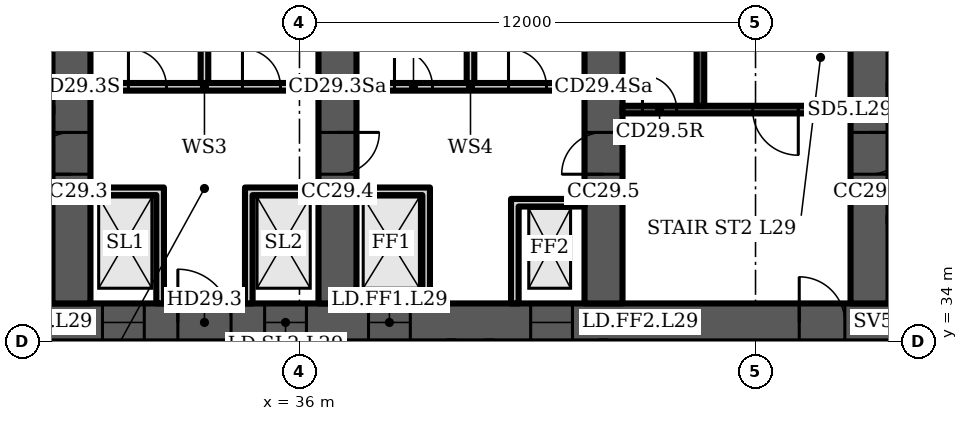
"""IFC4 building model, lengths in metres.
Left out: names, types, materials, properties, quantities, classifications, styles, units other than length and angle.
Written with IfcOpenShell. Run it as: python <this file> out.ifc"""

import sys

from ifc_helpers import new_model, si_unit, direction, frame, frame_2d, origin, place, context, subcontext, project, spatial, polyline, rectangle, outline, extrude, element, fill, save


model = new_model("IFC4")
c1 = context("Model", 3, precision=1e-05, world=origin(), true_north=direction((0.0, 1.0)))
c2 = subcontext(c1, "Body", "Model", "MODEL_VIEW")
j1 = project(units=[si_unit("LENGTHUNIT", "METRE"), si_unit("PLANEANGLEUNIT", "RADIAN")], contexts=[c1])
p1 = place(None, origin())
s1 = spatial("IfcSite", under=j1, at=p1, CompositionType="ELEMENT")
p2 = place(p1, origin())
s2 = spatial("IfcBuilding", under=s1, at=p2, CompositionType="ELEMENT")
p3 = place(p2, frame((0.0, 0.0, 125.5)))
s3 = spatial("IfcBuildingStorey", under=s2, at=p3, CompositionType="ELEMENT", Elevation=125.5)
p4 = place(p3, frame((16.0, 34.5, 0.0), z_axis=(0.0, 0.0, 1.0), x_axis=(1.0, 0.0, 0.0)))
e1 = element("IfcWall", 1, at=p4, inside=s3, PredefinedType="SHEAR", context=c2, shape_type="SweptSolid", body=[
    extrude(rectangle(XDim=49.0, YDim=1.0, at=frame_2d((24.5, 0.0))), origin(), (0.0, 0.0, 1.0), 3.6),
])
p5 = place(p4, frame((1.2, 0.0, 0.0)))
e2 = element("IfcOpeningElement", 2, at=p5, cuts=e1, PredefinedType="OPENING", context=c2, shape_type="SweptSolid", body=[
    extrude(rectangle(XDim=1.1, YDim=2.1, at=frame_2d((0.55, 1.05))), frame((0.0, 0.51, 0.0), z_axis=(0.0, -1.0, 0.0), x_axis=(1.0, 0.0, 0.0)), (0.0, 0.0, 1.0), 1.02),
])
p6 = place(p4, frame((5.083, 0.0, 0.0)))
e3 = element("IfcOpeningElement", 3, at=p6, cuts=e1, PredefinedType="OPENING", context=c2, shape_type="SweptSolid", body=[
    extrude(rectangle(XDim=1.1, YDim=2.1, at=frame_2d((0.55, 1.05))), frame((0.0, 0.51, 0.0), z_axis=(0.0, -1.0, 0.0), x_axis=(1.0, 0.0, 0.0)), (0.0, 0.0, 1.0), 1.02),
])
p7 = place(p4, frame((2.933, 0.0, 0.0)))
e4 = element("IfcOpeningElement", 4, at=p7, cuts=e1, PredefinedType="OPENING", context=c2, shape_type="SweptSolid", body=[
    extrude(rectangle(XDim=1.4, YDim=2.1, at=frame_2d((0.7, 1.05))), frame((0.0, 0.51, 0.0), z_axis=(0.0, -1.0, 0.0), x_axis=(1.0, 0.0, 0.0)), (0.0, 0.0, 1.0), 1.02),
])
p8 = place(p4, frame((7.65, 0.0, 0.0)))
e5 = element("IfcOpeningElement", 5, at=p8, cuts=e1, PredefinedType="OPENING", context=c2, shape_type="SweptSolid", body=[
    extrude(rectangle(XDim=1.2, YDim=2.1, at=frame_2d((0.6, 1.05))), frame((0.0, 0.51, 0.0), z_axis=(0.0, -1.0, 0.0), x_axis=(1.0, 0.0, 0.0)), (0.0, 0.0, 1.0), 1.02),
])
p9 = place(p4, frame((14.817, 0.0, 0.0)))
e6 = element("IfcOpeningElement", 6, at=p9, cuts=e1, PredefinedType="OPENING", context=c2, shape_type="SweptSolid", body=[
    extrude(rectangle(XDim=1.1, YDim=2.1, at=frame_2d((0.55, 1.05))), frame((0.0, 0.51, 0.0), z_axis=(0.0, -1.0, 0.0), x_axis=(1.0, 0.0, 0.0)), (0.0, 0.0, 1.0), 1.02),
])
p10 = place(p4, frame((19.083, 0.0, 0.0)))
e7 = element("IfcOpeningElement", 7, at=p10, cuts=e1, PredefinedType="OPENING", context=c2, shape_type="SweptSolid", body=[
    extrude(rectangle(XDim=1.1, YDim=2.1, at=frame_2d((0.55, 1.05))), frame((0.0, 0.51, 0.0), z_axis=(0.0, -1.0, 0.0), x_axis=(1.0, 0.0, 0.0)), (0.0, 0.0, 1.0), 1.02),
])
p11 = place(p4, frame((16.8, 0.0, 0.0)))
e8 = element("IfcOpeningElement", 8, at=p11, cuts=e1, PredefinedType="OPENING", context=c2, shape_type="SweptSolid", body=[
    extrude(rectangle(XDim=1.4, YDim=2.1, at=frame_2d((0.7, 1.05))), frame((0.0, 0.51, 0.0), z_axis=(0.0, -1.0, 0.0), x_axis=(1.0, 0.0, 0.0)), (0.0, 0.0, 1.0), 1.02),
])
p12 = place(p4, frame((21.817, 0.0, 0.0)))
e9 = element("IfcOpeningElement", 9, at=p12, cuts=e1, PredefinedType="OPENING", context=c2, shape_type="SweptSolid", body=[
    extrude(rectangle(XDim=1.1, YDim=2.1, at=frame_2d((0.55, 1.05))), frame((0.0, 0.51, 0.0), z_axis=(0.0, -1.0, 0.0), x_axis=(1.0, 0.0, 0.0)), (0.0, 0.0, 1.0), 1.02),
])
p13 = place(p4, frame((26.083, 0.0, 0.0)))
e10 = element("IfcOpeningElement", 10, at=p13, cuts=e1, PredefinedType="OPENING", context=c2, shape_type="SweptSolid", body=[
    extrude(rectangle(XDim=1.1, YDim=2.1, at=frame_2d((0.55, 1.05))), frame((0.0, 0.51, 0.0), z_axis=(0.0, -1.0, 0.0), x_axis=(1.0, 0.0, 0.0)), (0.0, 0.0, 1.0), 1.02),
])
p14 = place(p4, frame((33.15, 0.0, 0.0)))
e11 = element("IfcOpeningElement", 11, at=p14, cuts=e1, PredefinedType="OPENING", context=c2, shape_type="SweptSolid", body=[
    extrude(rectangle(XDim=1.2, YDim=2.1, at=frame_2d((0.6, 1.05))), frame((0.0, 0.51, 0.0), z_axis=(0.0, -1.0, 0.0), x_axis=(1.0, 0.0, 0.0)), (0.0, 0.0, 1.0), 1.02),
])
p15 = place(p4, frame((37.8, 0.0, 0.0)))
e12 = element("IfcOpeningElement", 12, at=p15, cuts=e1, PredefinedType="OPENING", context=c2, shape_type="SweptSolid", body=[
    extrude(rectangle(XDim=1.4, YDim=2.1, at=frame_2d((0.7, 1.05))), frame((0.0, 0.51, 0.0), z_axis=(0.0, -1.0, 0.0), x_axis=(1.0, 0.0, 0.0)), (0.0, 0.0, 1.0), 1.02),
])
p16 = place(p4, frame((42.817, 0.0, 0.0)))
e13 = element("IfcOpeningElement", 13, at=p16, cuts=e1, PredefinedType="OPENING", context=c2, shape_type="SweptSolid", body=[
    extrude(rectangle(XDim=1.1, YDim=2.1, at=frame_2d((0.55, 1.05))), frame((0.0, 0.51, 0.0), z_axis=(0.0, -1.0, 0.0), x_axis=(1.0, 0.0, 0.0)), (0.0, 0.0, 1.0), 1.02),
])
p17 = place(p4, frame((46.7, 0.0, 0.0)))
e14 = element("IfcOpeningElement", 14, at=p17, cuts=e1, PredefinedType="OPENING", context=c2, shape_type="SweptSolid", body=[
    extrude(rectangle(XDim=1.1, YDim=2.1, at=frame_2d((0.55, 1.05))), frame((0.0, 0.51, 0.0), z_axis=(0.0, -1.0, 0.0), x_axis=(1.0, 0.0, 0.0)), (0.0, 0.0, 1.0), 1.02),
])
p18 = place(p4, frame((44.667, 0.0, 0.0)))
e15 = element("IfcOpeningElement", 15, at=p18, cuts=e1, PredefinedType="OPENING", context=c2, shape_type="SweptSolid", body=[
    extrude(rectangle(XDim=1.4, YDim=2.1, at=frame_2d((0.7, 1.05))), frame((0.0, 0.51, 0.0), z_axis=(0.0, -1.0, 0.0), x_axis=(1.0, 0.0, 0.0)), (0.0, 0.0, 1.0), 1.02),
])
p19 = place(p3, frame((30.0, 35.0, 0.0), z_axis=(0.0, 0.0, 1.0), x_axis=(0.0, 1.0, 0.0)))
e16 = element("IfcWall", 16, at=p19, inside=s3, PredefinedType="SHEAR", context=c2, shape_type="SweptSolid", body=[
    extrude(rectangle(XDim=13.965, YDim=1.0, at=frame_2d((6.982, 0.0))), origin(), (0.0, 0.0, 1.0), 3.6),
])
p20 = place(p19, frame((3.4, 0.0, 0.0)))
e17 = element("IfcOpeningElement", 17, at=p20, cuts=e16, PredefinedType="OPENING", context=c2, shape_type="SweptSolid", body=[
    extrude(rectangle(XDim=1.1, YDim=2.1, at=frame_2d((0.55, 1.05))), frame((0.0, 0.51, 0.0), z_axis=(0.0, -1.0, 0.0), x_axis=(1.0, 0.0, 0.0)), (0.0, 0.0, 1.0), 1.02),
])
p21 = place(p3, frame((37.0, 35.0, 0.0), z_axis=(0.0, 0.0, 1.0), x_axis=(0.0, 1.0, 0.0)))
e18 = element("IfcWall", 18, at=p21, inside=s3, PredefinedType="SHEAR", context=c2, shape_type="SweptSolid", body=[
    extrude(rectangle(XDim=14.577, YDim=1.0, at=frame_2d((7.289, 0.0))), origin(), (0.0, 0.0, 1.0), 3.6),
])
p22 = place(p21, frame((3.4, 0.0, 0.0)))
e19 = element("IfcOpeningElement", 19, at=p22, cuts=e18, PredefinedType="OPENING", context=c2, shape_type="SweptSolid", body=[
    extrude(rectangle(XDim=1.1, YDim=2.1, at=frame_2d((0.55, 1.05))), frame((0.0, 0.51, 0.0), z_axis=(0.0, -1.0, 0.0), x_axis=(1.0, 0.0, 0.0)), (0.0, 0.0, 1.0), 1.02),
])
p23 = place(p21, frame((9.8, 0.0, 0.0)))
e20 = element("IfcOpeningElement", 20, at=p23, cuts=e18, PredefinedType="OPENING", context=c2, shape_type="SweptSolid", body=[
    extrude(rectangle(XDim=1.0, YDim=2.1, at=frame_2d((0.5, 1.05))), frame((0.0, 0.51, 0.0), z_axis=(0.0, -1.0, 0.0), x_axis=(1.0, 0.0, 0.0)), (0.0, 0.0, 1.0), 1.02),
])
p24 = place(p3, frame((44.0, 35.0, 0.0), z_axis=(0.0, 0.0, 1.0), x_axis=(0.0, 1.0, 0.0)))
e21 = element("IfcWall", 21, at=p24, inside=s3, PredefinedType="SHEAR", context=c2, shape_type="SweptSolid", body=[
    extrude(rectangle(XDim=14.577, YDim=1.0, at=frame_2d((7.289, 0.0))), origin(), (0.0, 0.0, 1.0), 3.6),
])
p25 = place(p24, frame((3.4, 0.0, 0.0)))
e22 = element("IfcOpeningElement", 22, at=p25, cuts=e21, PredefinedType="OPENING", context=c2, shape_type="SweptSolid", body=[
    extrude(rectangle(XDim=1.1, YDim=2.1, at=frame_2d((0.55, 1.05))), frame((0.0, 0.51, 0.0), z_axis=(0.0, -1.0, 0.0), x_axis=(1.0, 0.0, 0.0)), (0.0, 0.0, 1.0), 1.02),
])
p26 = place(p24, frame((9.8, 0.0, 0.0)))
e23 = element("IfcOpeningElement", 23, at=p26, cuts=e21, PredefinedType="OPENING", context=c2, shape_type="SweptSolid", body=[
    extrude(rectangle(XDim=1.0, YDim=2.1, at=frame_2d((0.5, 1.05))), frame((0.0, 0.51, 0.0), z_axis=(0.0, -1.0, 0.0), x_axis=(1.0, 0.0, 0.0)), (0.0, 0.0, 1.0), 1.02),
])
p27 = place(p3, frame((51.0, 35.0, 0.0), z_axis=(0.0, 0.0, 1.0), x_axis=(0.0, 1.0, 0.0)))
e24 = element("IfcWall", 24, at=p27, inside=s3, PredefinedType="SHEAR", context=c2, shape_type="SweptSolid", body=[
    extrude(rectangle(XDim=13.965, YDim=1.0, at=frame_2d((6.982, 0.0))), origin(), (0.0, 0.0, 1.0), 3.6),
])
p28 = place(p27, frame((3.4, 0.0, 0.0)))
e25 = element("IfcOpeningElement", 25, at=p28, cuts=e24, PredefinedType="OPENING", context=c2, shape_type="SweptSolid", body=[
    extrude(rectangle(XDim=1.1, YDim=2.1, at=frame_2d((0.55, 1.05))), frame((0.0, 0.51, 0.0), z_axis=(0.0, -1.0, 0.0), x_axis=(1.0, 0.0, 0.0)), (0.0, 0.0, 1.0), 1.02),
])
p29 = place(p3, frame((30.5, 40.7, 0.0), z_axis=(0.0, 0.0, 1.0), x_axis=(1.0, 0.0, 0.0)))
e26 = element("IfcWall", 26, at=p29, inside=s3, PredefinedType="PARTITIONING", context=c2, shape_type="SweptSolid", body=[
    extrude(rectangle(XDim=6.0, YDim=0.2, at=frame_2d((3.0, 0.0))), origin(), (0.0, 0.0, 1.0), 3.2),
])
p30 = place(p29, frame((1.0, 0.0, 0.0)))
e27 = element("IfcOpeningElement", 27, at=p30, cuts=e26, PredefinedType="OPENING", context=c2, shape_type="SweptSolid", body=[
    extrude(rectangle(XDim=1.0, YDim=2.1, at=frame_2d((0.5, 1.05))), frame((0.0, 0.11, 0.0), z_axis=(0.0, -1.0, 0.0), x_axis=(1.0, 0.0, 0.0)), (0.0, 0.0, 1.0), 0.22),
])
p31 = place(p29, frame((4.0, 0.0, 0.0)))
e28 = element("IfcOpeningElement", 28, at=p31, cuts=e26, PredefinedType="OPENING", context=c2, shape_type="SweptSolid", body=[
    extrude(rectangle(XDim=1.0, YDim=2.1, at=frame_2d((0.5, 1.05))), frame((0.0, 0.11, 0.0), z_axis=(0.0, -1.0, 0.0), x_axis=(1.0, 0.0, 0.0)), (0.0, 0.0, 1.0), 0.22),
])
p32 = place(p3, frame((0.0, 0.0, -0.0)))
e29 = element("IfcWall", 29, at=p32, inside=s3, PredefinedType="PARTITIONING", context=c2, shape_type="SweptSolid", body=[
    extrude(outline(polyline([(32.233, 37.85), (30.5, 37.85), (30.5, 38.05), (32.233, 38.05), (32.433, 38.05), (32.433, 35.0), (32.233, 35.0), (32.233, 37.85)])), origin(), (0.0, 0.0, 1.0), 3.2),
])
p33 = place(p3, frame((0.0, 0.0, -0.0)))
e30 = element("IfcWall", 30, at=p33, inside=s3, PredefinedType="PARTITIONING", context=c2, shape_type="SweptSolid", body=[
    extrude(outline(polyline([(34.567, 38.05), (34.767, 38.05), (36.5, 38.05), (36.5, 37.85), (34.767, 37.85), (34.767, 35.0), (34.567, 35.0), (34.567, 38.05)])), origin(), (0.0, 0.0, 1.0), 3.2),
])
p34 = place(p3, frame((33.5, 40.8, 0.0), z_axis=(0.0, 0.0, 1.0), x_axis=(0.0, 1.0, 0.0)))
e31 = element("IfcWall", 31, at=p34, inside=s3, PredefinedType="PARTITIONING", context=c2, shape_type="SweptSolid", body=[
    extrude(rectangle(XDim=8.232, YDim=0.2, at=frame_2d((4.116, 0.0))), origin(), (0.0, 0.0, 1.0), 3.2),
])
p35 = place(p3, frame((37.5, 40.7, 0.0), z_axis=(0.0, 0.0, 1.0), x_axis=(1.0, 0.0, 0.0)))
e32 = element("IfcWall", 32, at=p35, inside=s3, PredefinedType="PARTITIONING", context=c2, shape_type="SweptSolid", body=[
    extrude(rectangle(XDim=6.0, YDim=0.2, at=frame_2d((3.0, 0.0))), origin(), (0.0, 0.0, 1.0), 3.2),
])
p36 = place(p35, frame((1.0, 0.0, 0.0)))
e33 = element("IfcOpeningElement", 33, at=p36, cuts=e32, PredefinedType="OPENING", context=c2, shape_type="SweptSolid", body=[
    extrude(rectangle(XDim=1.0, YDim=2.1, at=frame_2d((0.5, 1.05))), frame((0.0, 0.11, 0.0), z_axis=(0.0, -1.0, 0.0), x_axis=(1.0, 0.0, 0.0)), (0.0, 0.0, 1.0), 0.22),
])
p37 = place(p35, frame((4.0, 0.0, 0.0)))
e34 = element("IfcOpeningElement", 34, at=p37, cuts=e32, PredefinedType="OPENING", context=c2, shape_type="SweptSolid", body=[
    extrude(rectangle(XDim=1.0, YDim=2.1, at=frame_2d((0.5, 1.05))), frame((0.0, 0.11, 0.0), z_axis=(0.0, -1.0, 0.0), x_axis=(1.0, 0.0, 0.0)), (0.0, 0.0, 1.0), 0.22),
])
p38 = place(p3, frame((0.0, 0.0, -0.0)))
e35 = element("IfcWall", 35, at=p38, inside=s3, PredefinedType="PARTITIONING", context=c2, shape_type="SweptSolid", body=[
    extrude(outline(polyline([(41.567, 37.75), (41.767, 37.75), (43.5, 37.75), (43.5, 37.55), (41.767, 37.55), (41.767, 35.0), (41.567, 35.0), (41.567, 37.75)])), origin(), (0.0, 0.0, 1.0), 3.2),
])
p39 = place(p3, frame((0.0, 0.0, -0.0)))
e36 = element("IfcWall", 36, at=p39, inside=s3, PredefinedType="PARTITIONING", context=c2, shape_type="SweptSolid", body=[
    extrude(outline(polyline([(39.233, 37.85), (37.5, 37.85), (37.5, 38.05), (39.233, 38.05), (39.433, 38.05), (39.433, 35.0), (39.233, 35.0), (39.233, 37.85)])), origin(), (0.0, 0.0, 1.0), 3.2),
])
p40 = place(p3, frame((40.5, 40.8, 0.0), z_axis=(0.0, 0.0, 1.0), x_axis=(0.0, 1.0, 0.0)))
e37 = element("IfcWall", 37, at=p40, inside=s3, PredefinedType="PARTITIONING", context=c2, shape_type="SweptSolid", body=[
    extrude(rectangle(XDim=8.844, YDim=0.2, at=frame_2d((4.422, 0.0))), origin(), (0.0, 0.0, 1.0), 3.2),
])
p41 = place(p3, frame((44.5, 40.1, 0.0), z_axis=(0.0, 0.0, 1.0), x_axis=(1.0, 0.0, 0.0)))
e38 = element("IfcWall", 38, at=p41, inside=s3, PredefinedType="SHEAR", context=c2, shape_type="SweptSolid", body=[
    extrude(rectangle(XDim=6.0, YDim=0.2, at=frame_2d((3.0, 0.0))), origin(), (0.0, 0.0, 1.0), 3.2),
])
p42 = place(p41, frame((3.425, 0.0, 0.0)))
e39 = element("IfcOpeningElement", 39, at=p42, cuts=e38, PredefinedType="OPENING", context=c2, shape_type="SweptSolid", body=[
    extrude(rectangle(XDim=1.2, YDim=2.1, at=frame_2d((0.6, 1.05))), frame((0.0, 0.11, 0.0), z_axis=(0.0, -1.0, 0.0), x_axis=(1.0, 0.0, 0.0)), (0.0, 0.0, 1.0), 0.22),
])
p43 = place(p41, frame((0.525, 0.0, 0.0)))
e40 = element("IfcOpeningElement", 40, at=p43, cuts=e38, PredefinedType="OPENING", context=c2, shape_type="SweptSolid", body=[
    extrude(rectangle(XDim=0.9, YDim=2.1, at=frame_2d((0.45, 1.05))), frame((0.0, 0.11, 0.0), z_axis=(0.0, -1.0, 0.0), x_axis=(1.0, 0.0, 0.0)), (0.0, 0.0, 1.0), 0.22),
])
p44 = place(p3, frame((46.55, 40.2, 0.0), z_axis=(0.0, 0.0, 1.0), x_axis=(0.0, 1.0, 0.0)))
e41 = element("IfcWall", 41, at=p44, inside=s3, PredefinedType="SHEAR", context=c2, shape_type="SweptSolid", body=[
    extrude(rectangle(XDim=7.2, YDim=0.2, at=frame_2d((3.6, 0.0))), origin(), (0.0, 0.0, 1.0), 3.2),
])
p45 = place(p9, origin())
e42 = element("IfcDoor", 42, at=p45, inside=s3, OperationType="DOUBLE_DOOR_SLIDING", PredefinedType="DOOR", context=c2, shape_type="SweptSolid", body=[
    extrude(rectangle(XDim=1.1, YDim=2.1, at=frame_2d((0.55, 1.05))), frame((0.0, 0.025, 0.0), z_axis=(0.0, -1.0, 0.0), x_axis=(1.0, 0.0, 0.0)), (0.0, 0.0, 1.0), 0.05),
])
fill(e6, e42)
p46 = place(p10, origin())
e43 = element("IfcDoor", 43, at=p46, inside=s3, OperationType="DOUBLE_DOOR_SLIDING", PredefinedType="DOOR", context=c2, shape_type="SweptSolid", body=[
    extrude(rectangle(XDim=1.1, YDim=2.1, at=frame_2d((0.55, 1.05))), frame((0.0, 0.025, 0.0), z_axis=(0.0, -1.0, 0.0), x_axis=(1.0, 0.0, 0.0)), (0.0, 0.0, 1.0), 0.05),
])
fill(e7, e43)
p47 = place(p11, origin())
e44 = element("IfcDoor", 44, at=p47, inside=s3, OperationType="DOUBLE_DOOR_SINGLE_SWING", PredefinedType="DOOR", context=c2, shape_type="SweptSolid", body=[
    extrude(rectangle(XDim=1.4, YDim=2.1, at=frame_2d((0.7, 1.05))), frame((0.0, 0.025, 0.0), z_axis=(0.0, -1.0, 0.0), x_axis=(1.0, 0.0, 0.0)), (0.0, 0.0, 1.0), 0.05),
])
fill(e8, e44)
p48 = place(p30, origin())
e45 = element("IfcDoor", 45, at=p48, inside=s3, OperationType="SINGLE_SWING_LEFT", PredefinedType="DOOR", context=c2, shape_type="SweptSolid", body=[
    extrude(rectangle(XDim=1.0, YDim=2.1, at=frame_2d((0.5, 1.05))), frame((0.0, 0.025, 0.0), z_axis=(0.0, -1.0, 0.0), x_axis=(1.0, 0.0, 0.0)), (0.0, 0.0, 1.0), 0.05),
])
fill(e27, e45)
p49 = place(p31, origin())
e46 = element("IfcDoor", 46, at=p49, inside=s3, OperationType="SINGLE_SWING_LEFT", PredefinedType="DOOR", context=c2, shape_type="SweptSolid", body=[
    extrude(rectangle(XDim=1.0, YDim=2.1, at=frame_2d((0.5, 1.05))), frame((0.0, 0.025, 0.0), z_axis=(0.0, -1.0, 0.0), x_axis=(1.0, 0.0, 0.0)), (0.0, 0.0, 1.0), 0.05),
])
fill(e28, e46)
p50 = place(p12, origin())
e47 = element("IfcDoor", 47, at=p50, inside=s3, OperationType="DOUBLE_DOOR_SLIDING", PredefinedType="DOOR", context=c2, shape_type="SweptSolid", body=[
    extrude(rectangle(XDim=1.1, YDim=2.1, at=frame_2d((0.55, 1.05))), frame((0.0, 0.025, 0.0), z_axis=(0.0, -1.0, 0.0), x_axis=(1.0, 0.0, 0.0)), (0.0, 0.0, 1.0), 0.05),
])
fill(e9, e47)
p51 = place(p13, origin())
e48 = element("IfcDoor", 48, at=p51, inside=s3, OperationType="DOUBLE_DOOR_SLIDING", PredefinedType="DOOR", context=c2, shape_type="SweptSolid", body=[
    extrude(rectangle(XDim=1.1, YDim=2.1, at=frame_2d((0.55, 1.05))), frame((0.0, 0.025, 0.0), z_axis=(0.0, -1.0, 0.0), x_axis=(1.0, 0.0, 0.0)), (0.0, 0.0, 1.0), 0.05),
])
fill(e10, e48)
p52 = place(p36, origin())
e49 = element("IfcDoor", 49, at=p52, inside=s3, OperationType="SINGLE_SWING_LEFT", PredefinedType="DOOR", context=c2, shape_type="SweptSolid", body=[
    extrude(rectangle(XDim=1.0, YDim=2.1, at=frame_2d((0.5, 1.05))), frame((0.0, 0.025, 0.0), z_axis=(0.0, -1.0, 0.0), x_axis=(1.0, 0.0, 0.0)), (0.0, 0.0, 1.0), 0.05),
])
fill(e33, e49)
p53 = place(p37, origin())
e50 = element("IfcDoor", 50, at=p53, inside=s3, OperationType="SINGLE_SWING_LEFT", PredefinedType="DOOR", context=c2, shape_type="SweptSolid", body=[
    extrude(rectangle(XDim=1.0, YDim=2.1, at=frame_2d((0.5, 1.05))), frame((0.0, 0.025, 0.0), z_axis=(0.0, -1.0, 0.0), x_axis=(1.0, 0.0, 0.0)), (0.0, 0.0, 1.0), 0.05),
])
fill(e34, e50)
p54 = place(p42, origin())
e51 = element("IfcDoor", 51, at=p54, inside=s3, OperationType="SINGLE_SWING_RIGHT", PredefinedType="DOOR", context=c2, shape_type="SweptSolid", body=[
    extrude(rectangle(XDim=1.2, YDim=2.1, at=frame_2d((0.6, 1.05))), frame((0.0, 0.025, 0.0), z_axis=(0.0, -1.0, 0.0), x_axis=(1.0, 0.0, 0.0)), (0.0, 0.0, 1.0), 0.05),
])
fill(e39, e51)
p55 = place(p43, origin())
e52 = element("IfcDoor", 52, at=p55, inside=s3, OperationType="SINGLE_SWING_LEFT", PredefinedType="DOOR", context=c2, shape_type="SweptSolid", body=[
    extrude(rectangle(XDim=0.9, YDim=2.1, at=frame_2d((0.45, 1.05))), frame((0.0, 0.025, 0.0), z_axis=(0.0, -1.0, 0.0), x_axis=(1.0, 0.0, 0.0)), (0.0, 0.0, 1.0), 0.05),
])
fill(e40, e52)
p56 = place(p14, origin())
e53 = element("IfcDoor", 53, at=p56, inside=s3, OperationType="SINGLE_SWING_LEFT", PredefinedType="DOOR", context=c2, shape_type="SweptSolid", body=[
    extrude(rectangle(XDim=1.2, YDim=2.1, at=frame_2d((0.6, 1.05))), frame((0.0, 0.025, 0.0), z_axis=(0.0, -1.0, 0.0), x_axis=(1.0, 0.0, 0.0)), (0.0, 0.0, 1.0), 0.05),
])
fill(e11, e53)
p57 = place(p20, origin())
e54 = element("IfcDoor", 54, at=p57, inside=s3, OperationType="SINGLE_SWING_LEFT", PredefinedType="DOOR", context=c2, shape_type="SweptSolid", body=[
    extrude(rectangle(XDim=1.1, YDim=2.1, at=frame_2d((0.55, 1.05))), frame((0.0, 0.025, 0.0), z_axis=(0.0, -1.0, 0.0), x_axis=(1.0, 0.0, 0.0)), (0.0, 0.0, 1.0), 0.05),
])
fill(e17, e54)
p58 = place(p22, origin())
e55 = element("IfcDoor", 55, at=p58, inside=s3, OperationType="SINGLE_SWING_RIGHT", PredefinedType="DOOR", context=c2, shape_type="SweptSolid", body=[
    extrude(rectangle(XDim=1.1, YDim=2.1, at=frame_2d((0.55, 1.05))), frame((0.0, 0.025, 0.0), z_axis=(0.0, -1.0, 0.0), x_axis=(1.0, 0.0, 0.0)), (0.0, 0.0, 1.0), 0.05),
])
fill(e19, e55)
p59 = place(p25, origin())
e56 = element("IfcDoor", 56, at=p59, inside=s3, OperationType="SINGLE_SWING_LEFT", PredefinedType="DOOR", context=c2, shape_type="SweptSolid", body=[
    extrude(rectangle(XDim=1.1, YDim=2.1, at=frame_2d((0.55, 1.05))), frame((0.0, 0.025, 0.0), z_axis=(0.0, -1.0, 0.0), x_axis=(1.0, 0.0, 0.0)), (0.0, 0.0, 1.0), 0.05),
])
fill(e22, e56)
p60 = place(p28, origin())
e57 = element("IfcDoor", 57, at=p60, inside=s3, OperationType="SINGLE_SWING_RIGHT", PredefinedType="DOOR", context=c2, shape_type="SweptSolid", body=[
    extrude(rectangle(XDim=1.1, YDim=2.1, at=frame_2d((0.55, 1.05))), frame((0.0, 0.025, 0.0), z_axis=(0.0, -1.0, 0.0), x_axis=(1.0, 0.0, 0.0)), (0.0, 0.0, 1.0), 0.05),
])
fill(e25, e57)
save(model, sys.argv[1])
